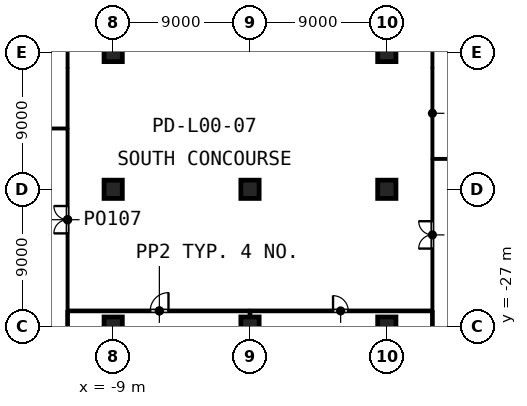
"""IFC4 building model, lengths in metres.
Left out: names, types, materials, properties, quantities, classifications, styles, units other than length and angle.
Written with IfcOpenShell. Run it as: python <this file> out.ifc"""

import sys

from ifc_helpers import new_model, si_unit, direction, frame, frame_2d, origin, origin_2d, place, context, subcontext, project, spatial, rectangle, extrude, element, fill, save


model = new_model("IFC4")
c1 = context("Model", 3, precision=1e-05, world=origin(), true_north=direction((0.0, 1.0)))
c2 = subcontext(c1, "Body", "Model", "MODEL_VIEW")
j1 = project(units=[si_unit("LENGTHUNIT", "METRE"), si_unit("PLANEANGLEUNIT", "RADIAN")], contexts=[c1])
p1 = place(None, origin())
s1 = spatial("IfcSite", under=j1, at=p1, CompositionType="ELEMENT")
p2 = place(p1, origin())
s2 = spatial("IfcBuilding", under=s1, at=p2, CompositionType="ELEMENT")
p3 = place(p2, origin())
s3 = spatial("IfcBuildingStorey", under=s2, at=p3, CompositionType="ELEMENT", Elevation=0.0)
for number, where, z_axis, x_axis in (
    (1, (-9.0, -27.0, 0.0), (0.0, 0.0, 1.0), (1.0, 0.0, 0.0)),
    (2, (-9.0, -18.0, 0.0), (0.0, 0.0, 1.0), (1.0, 0.0, 0.0)),
    (3, (-9.0, -9.0, 0.0), (0.0, 0.0, 1.0), (1.0, 0.0, 0.0)),
    (4, (0.0, -27.0, 0.0), (0.0, 0.0, 1.0), (1.0, 0.0, 0.0)),
    (5, (0.0, -18.0, 0.0), (0.0, 0.0, 1.0), (1.0, 0.0, 0.0)),
    (6, (9.0, -27.0, 0.0), (0.0, 0.0, 1.0), (1.0, 0.0, 0.0)),
    (7, (9.0, -18.0, 0.0), (0.0, 0.0, 1.0), (1.0, 0.0, 0.0)),
    (8, (9.0, -9.0, 0.0), (0.0, 0.0, 1.0), (1.0, 0.0, 0.0)),
):
    element("IfcColumn", number, at=place(p3, frame(where, z_axis=z_axis, x_axis=x_axis)), inside=s3, PredefinedType="COLUMN", context=c2, shape_type="SweptSolid", body=[
        extrude(rectangle(XDim=1.2, YDim=1.2, at=origin_2d()), origin(), (0.0, 0.0, 1.0), 7.2),
    ])
p4 = place(p3, frame((-12.0, -26.0, 0.0), z_axis=(0.0, 0.0, 1.0), x_axis=(0.0, 1.0, 0.0)))
e9 = element("IfcWall", 9, at=p4, inside=s3, PredefinedType="PARTITIONING", context=c2, shape_type="SweptSolid", body=[
    extrude(rectangle(XDim=12.0, YDim=0.1, at=frame_2d((6.0, 0.0))), origin(), (0.0, 0.0, 1.0), 6.9),
])
p5 = place(p4, frame((5.1, 0.0, 0.0)))
e10 = element("IfcOpeningElement", 10, at=p5, cuts=e9, PredefinedType="OPENING", context=c2, shape_type="SweptSolid", body=[
    extrude(rectangle(XDim=1.8, YDim=2.1, at=frame_2d((0.9, 1.05))), frame((0.0, 0.06, 0.0), z_axis=(0.0, -1.0, 0.0), x_axis=(1.0, 0.0, 0.0)), (0.0, 0.0, 1.0), 0.12),
])
p6 = place(p3, frame((-12.0, -14.0, 0.0), z_axis=(0.0, 0.0, 1.0), x_axis=(0.0, 1.0, 0.0)))
e11 = element("IfcWall", 11, at=p6, inside=s3, PredefinedType="PARTITIONING", context=c2, shape_type="SweptSolid", body=[
    extrude(rectangle(XDim=4.0, YDim=0.1, at=frame_2d((2.0, 0.0))), origin(), (0.0, 0.0, 1.0), 6.9),
])
p7 = place(p3, frame((12.0, -16.0, 0.0), z_axis=(0.0, 0.0, 1.0), x_axis=(0.0, 1.0, 0.0)))
e12 = element("IfcWall", 12, at=p7, inside=s3, PredefinedType="PARTITIONING", context=c2, shape_type="SweptSolid", body=[
    extrude(rectangle(XDim=6.0, YDim=0.1, at=frame_2d((3.0, 0.0))), origin(), (0.0, 0.0, 1.0), 6.9),
])
p8 = place(p3, frame((12.0, -26.0, 0.0), z_axis=(0.0, 0.0, 1.0), x_axis=(0.0, 1.0, 0.0)))
e13 = element("IfcWall", 13, at=p8, inside=s3, PredefinedType="PARTITIONING", context=c2, shape_type="SweptSolid", body=[
    extrude(rectangle(XDim=10.0, YDim=0.1, at=frame_2d((5.0, 0.0))), origin(), (0.0, 0.0, 1.0), 6.9),
])
p9 = place(p8, frame((4.1, 0.0, 0.0)))
e14 = element("IfcOpeningElement", 14, at=p9, cuts=e13, PredefinedType="OPENING", context=c2, shape_type="SweptSolid", body=[
    extrude(rectangle(XDim=1.8, YDim=2.1, at=frame_2d((0.9, 1.05))), frame((0.0, 0.06, 0.0), z_axis=(0.0, -1.0, 0.0), x_axis=(1.0, 0.0, 0.0)), (0.0, 0.0, 1.0), 0.12),
])
p10 = place(p3, frame((-11.925, -26.0, 0.0), z_axis=(0.0, 0.0, 1.0), x_axis=(1.0, 0.0, 0.0)))
e15 = element("IfcWall", 15, at=p10, inside=s3, PredefinedType="PARTITIONING", context=c2, shape_type="SweptSolid", body=[
    extrude(rectangle(XDim=11.925, YDim=0.15, at=frame_2d((5.962, 0.0))), origin(), (0.0, 0.0, 1.0), 6.9),
])
p11 = place(p10, frame((5.363, 0.0, 0.0)))
e16 = element("IfcOpeningElement", 16, at=p11, cuts=e15, PredefinedType="OPENING", context=c2, shape_type="SweptSolid", body=[
    extrude(rectangle(XDim=1.2, YDim=2.1, at=frame_2d((0.6, 1.05))), frame((0.0, 0.085, 0.0), z_axis=(0.0, -1.0, 0.0), x_axis=(1.0, 0.0, 0.0)), (0.0, 0.0, 1.0), 0.17),
])
p12 = place(p3, frame((0.0, -26.0, 0.0), z_axis=(0.0, 0.0, 1.0), x_axis=(1.0, 0.0, 0.0)))
e17 = element("IfcWall", 17, at=p12, inside=s3, PredefinedType="PARTITIONING", context=c2, shape_type="SweptSolid", body=[
    extrude(rectangle(XDim=11.925, YDim=0.15, at=frame_2d((5.962, 0.0))), origin(), (0.0, 0.0, 1.0), 6.9),
])
p13 = place(p12, frame((5.462, 0.0, 0.0)))
e18 = element("IfcOpeningElement", 18, at=p13, cuts=e17, PredefinedType="OPENING", context=c2, shape_type="SweptSolid", body=[
    extrude(rectangle(XDim=1.0, YDim=2.1, at=frame_2d((0.5, 1.05))), frame((0.0, 0.085, 0.0), z_axis=(0.0, -1.0, 0.0), x_axis=(1.0, 0.0, 0.0)), (0.0, 0.0, 1.0), 0.17),
])
p14 = place(p3, frame((-12.0, -10.0, 0.0), z_axis=(0.0, 0.0, 1.0), x_axis=(0.0, 1.0, 0.0)))
e19 = element("IfcWall", 19, at=p14, inside=s3, PredefinedType="PARTITIONING", context=c2, shape_type="SweptSolid", body=[
    extrude(rectangle(XDim=20.0, YDim=0.1, at=frame_2d((10.0, 0.0))), origin(), (0.0, 0.0, 1.0), 6.9),
])
p15 = place(p14, frame((4.7, 0.0, 0.0)))
e20 = element("IfcOpeningElement", 20, at=p15, cuts=e19, PredefinedType="OPENING", context=c2, shape_type="SweptSolid", body=[
    extrude(rectangle(XDim=1.8, YDim=2.1, at=frame_2d((0.9, 1.05))), frame((0.0, 0.06, 0.0), z_axis=(0.0, -1.0, 0.0), x_axis=(1.0, 0.0, 0.0)), (0.0, 0.0, 1.0), 0.12),
])
p16 = place(p14, frame((13.5, 0.0, 0.0)))
e21 = element("IfcOpeningElement", 21, at=p16, cuts=e19, PredefinedType="OPENING", context=c2, shape_type="SweptSolid", body=[
    extrude(rectangle(XDim=1.8, YDim=2.1, at=frame_2d((0.9, 1.05))), frame((0.0, 0.06, 0.0), z_axis=(0.0, -1.0, 0.0), x_axis=(1.0, 0.0, 0.0)), (0.0, 0.0, 1.0), 0.12),
])
p17 = place(p3, frame((12.0, -10.0, 0.0), z_axis=(0.0, 0.0, 1.0), x_axis=(0.0, 1.0, 0.0)))
e22 = element("IfcWall", 22, at=p17, inside=s3, PredefinedType="PARTITIONING", context=c2, shape_type="SweptSolid", body=[
    extrude(rectangle(XDim=20.0, YDim=0.1, at=frame_2d((10.0, 0.0))), origin(), (0.0, 0.0, 1.0), 6.9),
])
p18 = place(p17, frame((4.7, 0.0, 0.0)))
e23 = element("IfcOpeningElement", 23, at=p18, cuts=e22, PredefinedType="OPENING", context=c2, shape_type="SweptSolid", body=[
    extrude(rectangle(XDim=1.8, YDim=2.1, at=frame_2d((0.9, 1.05))), frame((0.0, 0.06, 0.0), z_axis=(0.0, -1.0, 0.0), x_axis=(1.0, 0.0, 0.0)), (0.0, 0.0, 1.0), 0.12),
])
p19 = place(p17, frame((13.5, 0.0, 0.0)))
e24 = element("IfcOpeningElement", 24, at=p19, cuts=e22, PredefinedType="OPENING", context=c2, shape_type="SweptSolid", body=[
    extrude(rectangle(XDim=1.8, YDim=2.1, at=frame_2d((0.9, 1.05))), frame((0.0, 0.06, 0.0), z_axis=(0.0, -1.0, 0.0), x_axis=(1.0, 0.0, 0.0)), (0.0, 0.0, 1.0), 0.12),
])
p20 = place(p3, frame((-50.0, -14.0, 0.0), z_axis=(0.0, 0.0, 1.0), x_axis=(1.0, 0.0, 0.0)))
e25 = element("IfcWall", 25, at=p20, inside=s3, PredefinedType="PARTITIONING", context=c2, shape_type="SweptSolid", body=[
    extrude(rectangle(XDim=37.95, YDim=0.1, at=frame_2d((18.975, 0.0))), origin(), (0.0, 0.0, 1.0), 6.9),
])
p21 = place(p20, frame((14.52, 0.0, 0.0)))
e26 = element("IfcOpeningElement", 26, at=p21, cuts=e25, PredefinedType="OPENING", context=c2, shape_type="SweptSolid", body=[
    extrude(rectangle(XDim=1.8, YDim=2.1, at=frame_2d((0.9, 1.05))), frame((0.0, 0.06, 0.0), z_axis=(0.0, -1.0, 0.0), x_axis=(1.0, 0.0, 0.0)), (0.0, 0.0, 1.0), 0.12),
])
p22 = place(p3, frame((-12.0, -37.5, 0.0), z_axis=(0.0, 0.0, 1.0), x_axis=(0.0, 1.0, 0.0)))
e27 = element("IfcWall", 27, at=p22, inside=s3, PredefinedType="PARTITIONING", context=c2, shape_type="SweptSolid", body=[
    extrude(rectangle(XDim=11.5, YDim=0.15, at=frame_2d((5.75, 0.0))), origin(), (0.0, 0.0, 1.0), 6.9),
])
p23 = place(p3, frame((12.05, -16.0, 0.0), z_axis=(0.0, 0.0, 1.0), x_axis=(1.0, 0.0, 0.0)))
e28 = element("IfcWall", 28, at=p23, inside=s3, PredefinedType="PARTITIONING", context=c2, shape_type="SweptSolid", body=[
    extrude(rectangle(XDim=27.95, YDim=0.1, at=frame_2d((13.975, 0.0))), origin(), (0.0, 0.0, 1.0), 6.9),
])
p24 = place(p3, frame((12.0, -37.68, 0.0), z_axis=(0.0, 0.0, 1.0), x_axis=(0.0, 1.0, 0.0)))
e29 = element("IfcWall", 29, at=p24, inside=s3, PredefinedType="PARTITIONING", context=c2, shape_type="SweptSolid", body=[
    extrude(rectangle(XDim=11.68, YDim=0.15, at=frame_2d((5.84, 0.0))), origin(), (0.0, 0.0, 1.0), 6.9),
])
p25 = place(p3, frame((0.0, -37.5, 0.0), z_axis=(0.0, 0.0, 1.0), x_axis=(0.0, 1.0, 0.0)))
e30 = element("IfcWall", 30, at=p25, inside=s3, PredefinedType="PARTITIONING", context=c2, shape_type="SweptSolid", body=[
    extrude(rectangle(XDim=11.425, YDim=0.15, at=frame_2d((5.712, 0.0))), origin(), (0.0, 0.0, 1.0), 5.91),
])
p26 = place(p5, origin())
e31 = element("IfcDoor", 31, at=p26, inside=s3, OperationType="DOUBLE_DOOR_DOUBLE_SWING", PredefinedType="DOOR", context=c2, shape_type="SweptSolid", body=[
    extrude(rectangle(XDim=1.8, YDim=2.1, at=frame_2d((0.9, 1.05))), frame((0.0, 0.025, 0.0), z_axis=(0.0, -1.0, 0.0), x_axis=(1.0, 0.0, 0.0)), (0.0, 0.0, 1.0), 0.05),
])
fill(e10, e31)
p27 = place(p9, origin())
e32 = element("IfcDoor", 32, at=p27, inside=s3, OperationType="DOUBLE_DOOR_DOUBLE_SWING", PredefinedType="DOOR", context=c2, shape_type="SweptSolid", body=[
    extrude(rectangle(XDim=1.8, YDim=2.1, at=frame_2d((0.9, 1.05))), frame((0.0, 0.025, 0.0), z_axis=(0.0, -1.0, 0.0), x_axis=(1.0, 0.0, 0.0)), (0.0, 0.0, 1.0), 0.05),
])
fill(e14, e32)
p28 = place(p11, origin())
e33 = element("IfcDoor", 33, at=p28, inside=s3, OperationType="SINGLE_SWING_RIGHT", PredefinedType="DOOR", context=c2, shape_type="SweptSolid", body=[
    extrude(rectangle(XDim=1.2, YDim=2.1, at=frame_2d((0.6, 1.05))), frame((0.0, 0.025, 0.0), z_axis=(0.0, -1.0, 0.0), x_axis=(1.0, 0.0, 0.0)), (0.0, 0.0, 1.0), 0.05),
])
fill(e16, e33)
p29 = place(p13, origin())
e34 = element("IfcDoor", 34, at=p29, inside=s3, OperationType="SINGLE_SWING_LEFT", PredefinedType="DOOR", context=c2, shape_type="SweptSolid", body=[
    extrude(rectangle(XDim=1.0, YDim=2.1, at=frame_2d((0.5, 1.05))), frame((0.0, 0.025, 0.0), z_axis=(0.0, -1.0, 0.0), x_axis=(1.0, 0.0, 0.0)), (0.0, 0.0, 1.0), 0.05),
])
fill(e18, e34)
save(model, sys.argv[1])
